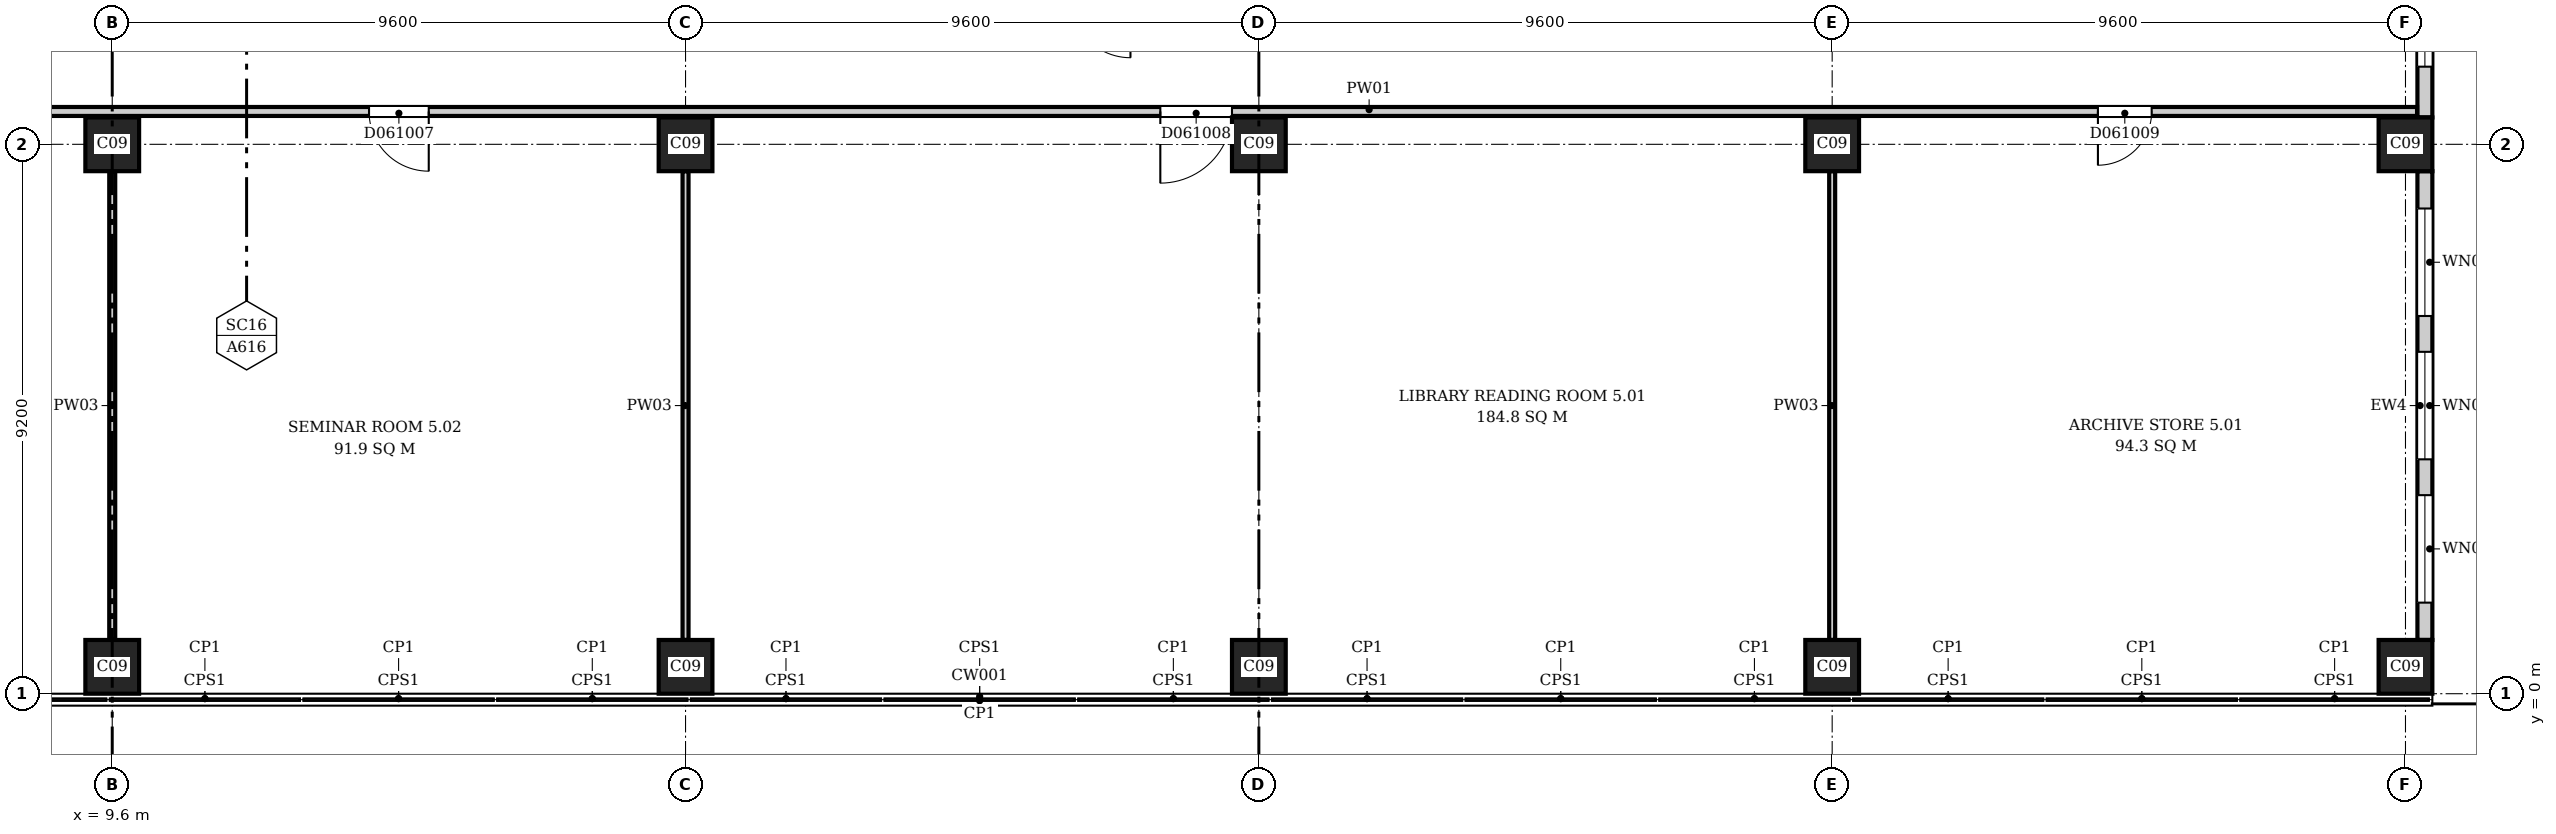
"""IFC4 building model, lengths in metres.
Left out: names, types, materials, properties, quantities, classifications, styles, units other than length and angle.
Written with IfcOpenShell. Run it as: python <this file> out.ifc"""

import sys

from ifc_helpers import new_model, si_unit, direction, frame, frame_2d, origin, origin_2d, place, context, subcontext, project, spatial, rectangle, extrude, element, fill, save


model = new_model("IFC4")
c1 = context("Model", 3, precision=1e-05, world=origin(), true_north=direction((0.0, 1.0)))
c2 = subcontext(c1, "Body", "Model", "MODEL_VIEW")
j1 = project(units=[si_unit("LENGTHUNIT", "METRE"), si_unit("PLANEANGLEUNIT", "RADIAN")], contexts=[c1])
p1 = place(None, origin())
s1 = spatial("IfcSite", under=j1, at=p1, CompositionType="ELEMENT")
p2 = place(p1, origin())
s2 = spatial("IfcBuilding", under=s1, at=p2, CompositionType="ELEMENT")
p3 = place(p2, frame((0.0, 0.0, 31.9)))
s3 = spatial("IfcBuildingStorey", under=s2, at=p3, CompositionType="ELEMENT", Elevation=31.9)
for number, where, z_axis, x_axis in (
    (1, (9.6, 0.45, 0.0), (0.0, 0.0, 1.0), (1.0, 0.0, 0.0)),
    (2, (19.2, 0.45, 0.0), (0.0, 0.0, 1.0), (1.0, 0.0, 0.0)),
    (3, (28.8, 0.45, 0.0), (0.0, 0.0, 1.0), (1.0, 0.0, 0.0)),
    (4, (38.4, 0.45, 0.0), (0.0, 0.0, 1.0), (1.0, 0.0, 0.0)),
    (5, (48.0, 0.45, 0.0), (0.0, 0.0, 1.0), (1.0, 0.0, 0.0)),
    (6, (9.6, 9.2, 0.0), (0.0, 0.0, 1.0), (1.0, 0.0, 0.0)),
    (7, (19.2, 9.2, 0.0), (0.0, 0.0, 1.0), (1.0, 0.0, 0.0)),
    (8, (28.8, 9.2, 0.0), (0.0, 0.0, 1.0), (1.0, 0.0, 0.0)),
    (9, (38.4, 9.2, 0.0), (0.0, 0.0, 1.0), (1.0, 0.0, 0.0)),
    (10, (48.0, 9.2, 0.0), (0.0, 0.0, 1.0), (1.0, 0.0, 0.0)),
):
    element("IfcColumn", number, at=place(p3, frame(where, z_axis=z_axis, x_axis=x_axis)), inside=s3, PredefinedType="COLUMN", context=c2, shape_type="SweptSolid", body=[
        extrude(rectangle(XDim=0.9, YDim=0.9, at=origin_2d()), origin(), (0.0, 0.0, 1.0), 4.2),
    ])
p4 = place(p3, frame((48.325, 0.9, 0.0), z_axis=(0.0, 0.0, 1.0), x_axis=(0.0, 1.0, 0.0)))
e11 = element("IfcWall", 11, at=p4, inside=s3, PredefinedType="ELEMENTEDWALL", context=c2, shape_type="SweptSolid", body=[
    extrude(rectangle(XDim=7.85, YDim=0.25, at=frame_2d((3.925, 0.0))), origin(), (0.0, 0.0, 1.0), 3.9),
])
p5 = place(p4, frame((0.625, 0.0, 0.9)))
e12 = element("IfcOpeningElement", 12, at=p5, cuts=e11, PredefinedType="OPENING", context=c2, shape_type="SweptSolid", body=[
    extrude(rectangle(XDim=1.8, YDim=2.6, at=frame_2d((0.9, 1.3))), frame((0.0, 0.135, 0.0), z_axis=(0.0, -1.0, 0.0), x_axis=(1.0, 0.0, 0.0)), (0.0, 0.0, 1.0), 0.27),
])
p6 = place(p4, frame((3.025, 0.0, 0.9)))
e13 = element("IfcOpeningElement", 13, at=p6, cuts=e11, PredefinedType="OPENING", context=c2, shape_type="SweptSolid", body=[
    extrude(rectangle(XDim=1.8, YDim=2.6, at=frame_2d((0.9, 1.3))), frame((0.0, 0.135, 0.0), z_axis=(0.0, -1.0, 0.0), x_axis=(1.0, 0.0, 0.0)), (0.0, 0.0, 1.0), 0.27),
])
p7 = place(p4, frame((5.425, 0.0, 0.9)))
e14 = element("IfcOpeningElement", 14, at=p7, cuts=e11, PredefinedType="OPENING", context=c2, shape_type="SweptSolid", body=[
    extrude(rectangle(XDim=1.8, YDim=2.6, at=frame_2d((0.9, 1.3))), frame((0.0, 0.135, 0.0), z_axis=(0.0, -1.0, 0.0), x_axis=(1.0, 0.0, 0.0)), (0.0, 0.0, 1.0), 0.27),
])
p8 = place(p3, frame((48.325, 9.65, 0.0), z_axis=(0.0, 0.0, 1.0), x_axis=(0.0, 1.0, 0.0)))
e15 = element("IfcWall", 15, at=p8, inside=s3, PredefinedType="ELEMENTEDWALL", context=c2, shape_type="SweptSolid", body=[
    extrude(rectangle(XDim=8.3, YDim=0.25, at=frame_2d((4.15, 0.0))), origin(), (0.0, 0.0, 1.0), 3.9),
])
p9 = place(p8, frame((3.25, 0.0, 0.0)))
e16 = element("IfcOpeningElement", 16, at=p9, cuts=e15, PredefinedType="OPENING", context=c2, shape_type="SweptSolid", body=[
    extrude(rectangle(XDim=1.8, YDim=2.4, at=frame_2d((0.9, 1.2))), frame((0.0, 0.135, 0.0), z_axis=(0.0, -1.0, 0.0), x_axis=(1.0, 0.0, 0.0)), (0.0, 0.0, 1.0), 0.27),
])
p10 = place(p8, frame((0.85, 0.0, 0.9)))
e17 = element("IfcOpeningElement", 17, at=p10, cuts=e15, PredefinedType="OPENING", context=c2, shape_type="SweptSolid", body=[
    extrude(rectangle(XDim=1.8, YDim=2.6, at=frame_2d((0.9, 1.3))), frame((0.0, 0.135, 0.0), z_axis=(0.0, -1.0, 0.0), x_axis=(1.0, 0.0, 0.0)), (0.0, 0.0, 1.0), 0.27),
])
p11 = place(p8, frame((5.65, 0.0, 0.9)))
e18 = element("IfcOpeningElement", 18, at=p11, cuts=e15, PredefinedType="OPENING", context=c2, shape_type="SweptSolid", body=[
    extrude(rectangle(XDim=1.8, YDim=2.6, at=frame_2d((0.9, 1.3))), frame((0.0, 0.135, 0.0), z_axis=(0.0, -1.0, 0.0), x_axis=(1.0, 0.0, 0.0)), (0.0, 0.0, 1.0), 0.27),
])
p12 = place(p3, frame((4.325, 9.75, 0.0), z_axis=(0.0, 0.0, 1.0), x_axis=(1.0, 0.0, 0.0)))
e19 = element("IfcWall", 19, at=p12, inside=s3, PredefinedType="PARTITIONING", context=c2, shape_type="SweptSolid", body=[
    extrude(rectangle(XDim=43.869, YDim=0.15, at=frame_2d((21.935, 0.0))), origin(), (0.0, 0.0, 1.0), 3.9),
])
p13 = place(p12, frame((2.175, 0.0, 0.0)))
e20 = element("IfcOpeningElement", 20, at=p13, cuts=e19, PredefinedType="OPENING", context=c2, shape_type="SweptSolid", body=[
    extrude(rectangle(XDim=1.0, YDim=2.1, at=frame_2d((0.5, 1.05))), frame((0.0, 0.085, 0.0), z_axis=(0.0, -1.0, 0.0), x_axis=(1.0, 0.0, 0.0)), (0.0, 0.0, 1.0), 0.17),
])
p14 = place(p12, frame((9.575, 0.0, 0.0)))
e21 = element("IfcOpeningElement", 21, at=p14, cuts=e19, PredefinedType="OPENING", context=c2, shape_type="SweptSolid", body=[
    extrude(rectangle(XDim=1.0, YDim=2.1, at=frame_2d((0.5, 1.05))), frame((0.0, 0.085, 0.0), z_axis=(0.0, -1.0, 0.0), x_axis=(1.0, 0.0, 0.0)), (0.0, 0.0, 1.0), 0.17),
])
p15 = place(p12, frame((22.825, 0.0, 0.0)))
e22 = element("IfcOpeningElement", 22, at=p15, cuts=e19, PredefinedType="OPENING", context=c2, shape_type="SweptSolid", body=[
    extrude(rectangle(XDim=1.2, YDim=2.1, at=frame_2d((0.6, 1.05))), frame((0.0, 0.085, 0.0), z_axis=(0.0, -1.0, 0.0), x_axis=(1.0, 0.0, 0.0)), (0.0, 0.0, 1.0), 0.17),
])
p16 = place(p12, frame((38.525, 0.0, 0.0)))
e23 = element("IfcOpeningElement", 23, at=p16, cuts=e19, PredefinedType="OPENING", context=c2, shape_type="SweptSolid", body=[
    extrude(rectangle(XDim=0.9, YDim=2.1, at=frame_2d((0.45, 1.05))), frame((0.0, 0.085, 0.0), z_axis=(0.0, -1.0, 0.0), x_axis=(1.0, 0.0, 0.0)), (0.0, 0.0, 1.0), 0.17),
])
for number, where, z_axis, x_axis in (
    (24, (9.6, 0.9, 0.0), (0.0, 0.0, 1.0), (0.0, 1.0, 0.0)),
    (25, (19.2, 0.9, 0.0), (0.0, 0.0, 1.0), (0.0, 1.0, 0.0)),
    (26, (38.4, 0.9, 0.0), (0.0, 0.0, 1.0), (0.0, 1.0, 0.0)),
):
    element("IfcWall", number, at=place(p3, frame(where, z_axis=z_axis, x_axis=x_axis)), inside=s3, PredefinedType="PARTITIONING", context=c2, shape_type="SweptSolid", body=[
        extrude(rectangle(XDim=7.85, YDim=0.1, at=frame_2d((3.925, 0.0))), origin(), (0.0, 0.0, 1.0), 3.9),
    ])
p17 = place(p5, origin())
e27 = element("IfcWindow", 27, at=p17, inside=s3, PartitioningType="SINGLE_PANEL", PredefinedType="WINDOW", context=c2, shape_type="SweptSolid", body=[
    extrude(rectangle(XDim=1.8, YDim=2.6, at=frame_2d((0.9, 1.3))), frame((0.0, 0.03, 0.0), z_axis=(0.0, -1.0, 0.0), x_axis=(1.0, 0.0, 0.0)), (0.0, 0.0, 1.0), 0.06),
])
fill(e12, e27)
p18 = place(p6, origin())
e28 = element("IfcWindow", 28, at=p18, inside=s3, PartitioningType="SINGLE_PANEL", PredefinedType="WINDOW", context=c2, shape_type="SweptSolid", body=[
    extrude(rectangle(XDim=1.8, YDim=2.6, at=frame_2d((0.9, 1.3))), frame((0.0, 0.03, 0.0), z_axis=(0.0, -1.0, 0.0), x_axis=(1.0, 0.0, 0.0)), (0.0, 0.0, 1.0), 0.06),
])
fill(e13, e28)
p19 = place(p7, origin())
e29 = element("IfcWindow", 29, at=p19, inside=s3, PartitioningType="SINGLE_PANEL", PredefinedType="WINDOW", context=c2, shape_type="SweptSolid", body=[
    extrude(rectangle(XDim=1.8, YDim=2.6, at=frame_2d((0.9, 1.3))), frame((0.0, 0.03, 0.0), z_axis=(0.0, -1.0, 0.0), x_axis=(1.0, 0.0, 0.0)), (0.0, 0.0, 1.0), 0.06),
])
fill(e14, e29)
p20 = place(p10, origin())
e30 = element("IfcWindow", 30, at=p20, inside=s3, PartitioningType="SINGLE_PANEL", PredefinedType="WINDOW", context=c2, shape_type="SweptSolid", body=[
    extrude(rectangle(XDim=1.8, YDim=2.6, at=frame_2d((0.9, 1.3))), frame((0.0, 0.03, 0.0), z_axis=(0.0, -1.0, 0.0), x_axis=(1.0, 0.0, 0.0)), (0.0, 0.0, 1.0), 0.06),
])
fill(e17, e30)
p21 = place(p14, origin())
e31 = element("IfcDoor", 31, at=p21, inside=s3, OperationType="SINGLE_SWING_RIGHT", PredefinedType="DOOR", context=c2, shape_type="SweptSolid", body=[
    extrude(rectangle(XDim=1.0, YDim=2.1, at=frame_2d((0.5, 1.05))), frame((0.0, 0.025, 0.0), z_axis=(0.0, -1.0, 0.0), x_axis=(1.0, 0.0, 0.0)), (0.0, 0.0, 1.0), 0.05),
])
fill(e21, e31)
p22 = place(p15, origin())
e32 = element("IfcDoor", 32, at=p22, inside=s3, OperationType="SINGLE_SWING_LEFT", PredefinedType="DOOR", context=c2, shape_type="SweptSolid", body=[
    extrude(rectangle(XDim=1.2, YDim=2.1, at=frame_2d((0.6, 1.05))), frame((0.0, 0.025, 0.0), z_axis=(0.0, -1.0, 0.0), x_axis=(1.0, 0.0, 0.0)), (0.0, 0.0, 1.0), 0.05),
])
fill(e22, e32)
p23 = place(p16, origin())
e33 = element("IfcDoor", 33, at=p23, inside=s3, OperationType="SINGLE_SWING_LEFT", PredefinedType="DOOR", context=c2, shape_type="SweptSolid", body=[
    extrude(rectangle(XDim=0.9, YDim=2.1, at=frame_2d((0.45, 1.05))), frame((0.0, 0.025, 0.0), z_axis=(0.0, -1.0, 0.0), x_axis=(1.0, 0.0, 0.0)), (0.0, 0.0, 1.0), 0.05),
])
fill(e23, e33)
save(model, sys.argv[1])
